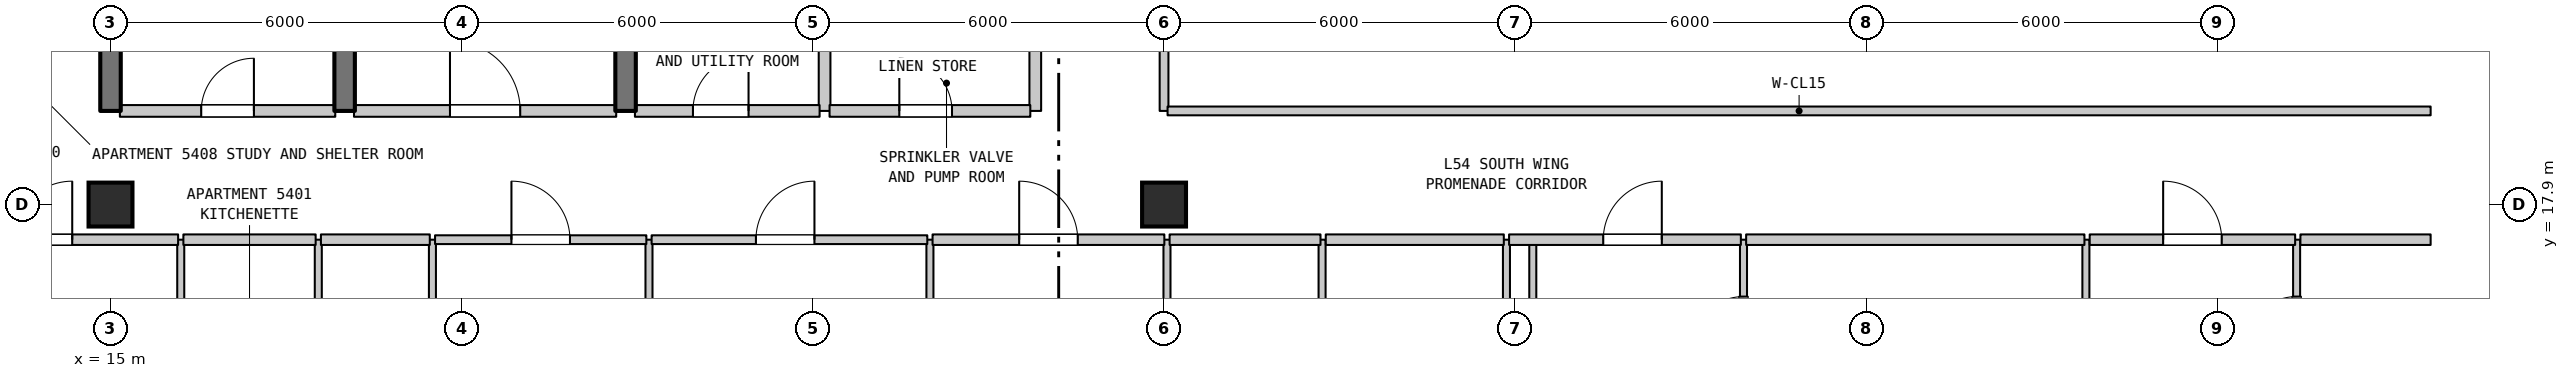
"""IFC4 building model, lengths in metres.
Left out: names, types, materials, properties, quantities, classifications, styles, units other than length and angle.
Written with IfcOpenShell. Run it as: python <this file> out.ifc"""

import sys

from ifc_helpers import new_model, si_unit, direction, frame, frame_2d, origin, origin_2d, place, context, subcontext, project, spatial, rectangle, extrude, element, fill, save


model = new_model("IFC4")
c1 = context("Model", 3, precision=1e-05, world=origin(), true_north=direction((0.0, 1.0)))
c2 = subcontext(c1, "Body", "Model", "MODEL_VIEW")
j1 = project(units=[si_unit("LENGTHUNIT", "METRE"), si_unit("PLANEANGLEUNIT", "RADIAN")], contexts=[c1])
p1 = place(None, origin())
s1 = spatial("IfcSite", under=j1, at=p1, CompositionType="ELEMENT")
p2 = place(p1, origin())
s2 = spatial("IfcBuilding", under=s1, at=p2, CompositionType="ELEMENT")
p3 = place(p2, frame((0.0, 0.0, 218.0)))
s3 = spatial("IfcBuildingStorey", under=s2, at=p3, CompositionType="ELEMENT", Elevation=218.0)
for number, where, z_axis, x_axis in (
    (1, (15.0, 17.9, 0.0), (0.0, 0.0, 1.0), (1.0, 0.0, 0.0)),
    (2, (33.0, 17.9, 0.0), (0.0, 0.0, 1.0), (1.0, 0.0, 0.0)),
):
    element("IfcColumn", number, at=place(p3, frame(where, z_axis=z_axis, x_axis=x_axis)), inside=s3, PredefinedType="COLUMN", context=c2, shape_type="SweptSolid", body=[
        extrude(rectangle(XDim=0.75, YDim=0.75, at=origin_2d()), origin(), (0.0, 0.0, 1.0), 4.8),
    ])
p4 = place(p3, frame((15.0, 19.5, 0.0), z_axis=(0.0, 0.0, 1.0), x_axis=(0.0, 1.0, 0.0)))
e3 = element("IfcWall", 3, at=p4, inside=s3, PredefinedType="SHEAR", context=c2, shape_type="SweptSolid", body=[
    extrude(rectangle(XDim=3.2, YDim=0.35, at=frame_2d((1.6, 0.0))), origin(), (0.0, 0.0, 1.0), 4.49),
])
p5 = place(p3, frame((16.2, 14.1, 0.0), z_axis=(0.0, 0.0, 1.0), x_axis=(0.0, 1.0, 0.0)))
e4 = element("IfcWall", 4, at=p5, inside=s3, PredefinedType="PARTITIONING", context=c2, shape_type="SweptSolid", body=[
    extrude(rectangle(XDim=3.2, YDim=0.12, at=frame_2d((1.6, 0.0))), origin(), (0.0, 0.0, 1.0), 4.49),
])
p6 = place(p5, frame((1.15, 0.0, 0.0)))
e5 = element("IfcOpeningElement", 5, at=p6, cuts=e4, PredefinedType="OPENING", context=c2, shape_type="SweptSolid", body=[
    extrude(rectangle(XDim=0.9, YDim=2.15, at=frame_2d((0.45, 1.075))), frame((0.0, 0.07, 0.0), z_axis=(0.0, -1.0, 0.0), x_axis=(1.0, 0.0, 0.0)), (0.0, 0.0, 1.0), 0.14),
])
p7 = place(p3, frame((18.55, 14.1, 0.0), z_axis=(0.0, 0.0, 1.0), x_axis=(0.0, 1.0, 0.0)))
e6 = element("IfcWall", 6, at=p7, inside=s3, PredefinedType="PARTITIONING", context=c2, shape_type="SweptSolid", body=[
    extrude(rectangle(XDim=3.2, YDim=0.12, at=frame_2d((1.6, 0.0))), origin(), (0.0, 0.0, 1.0), 4.49),
])
p8 = place(p3, frame((19.0, 19.5, 0.0), z_axis=(0.0, 0.0, 1.0), x_axis=(0.0, 1.0, 0.0)))
e7 = element("IfcWall", 7, at=p8, inside=s3, PredefinedType="SHEAR", context=c2, shape_type="SweptSolid", body=[
    extrude(rectangle(XDim=3.2, YDim=0.35, at=frame_2d((1.6, 0.0))), origin(), (0.0, 0.0, 1.0), 4.49),
])
p9 = place(p3, frame((20.5, 7.154, 0.0), z_axis=(0.0, 0.0, 1.0), x_axis=(0.0, 1.0, 0.0)))
e8 = element("IfcWall", 8, at=p9, inside=s3, PredefinedType="PARTITIONING", context=c2, shape_type="SweptSolid", body=[
    extrude(rectangle(XDim=10.146, YDim=0.12, at=frame_2d((5.073, 0.0))), origin(), (0.0, 0.0, 1.0), 4.49),
])
p10 = place(p3, frame((23.8, 19.5, 0.0), z_axis=(0.0, 0.0, 1.0), x_axis=(0.0, 1.0, 0.0)))
e9 = element("IfcWall", 9, at=p10, inside=s3, PredefinedType="SHEAR", context=c2, shape_type="SweptSolid", body=[
    extrude(rectangle(XDim=3.2, YDim=0.35, at=frame_2d((1.6, 0.0))), origin(), (0.0, 0.0, 1.0), 4.49),
])
p11 = place(p3, frame((24.2, 0.71, 0.0), z_axis=(0.0, 0.0, 1.0), x_axis=(0.0, 1.0, 0.0)))
e10 = element("IfcWall", 10, at=p11, inside=s3, PredefinedType="PARTITIONING", context=c2, shape_type="SweptSolid", body=[
    extrude(rectangle(XDim=16.59, YDim=0.12, at=frame_2d((8.295, 0.0))), origin(), (0.0, 0.0, 1.0), 4.49),
])
p12 = place(p3, frame((27.2, 19.5, 0.0), z_axis=(0.0, 0.0, 1.0), x_axis=(0.0, 1.0, 0.0)))
e11 = element("IfcWall", 11, at=p12, inside=s3, PredefinedType="STANDARD", context=c2, shape_type="SweptSolid", body=[
    extrude(rectangle(XDim=1.6, YDim=0.2, at=frame_2d((0.8, 0.0))), origin(), (0.0, 0.0, 1.0), 4.49),
])
p13 = place(p3, frame((29.0, 0.71, 0.0), z_axis=(0.0, 0.0, 1.0), x_axis=(0.0, 1.0, 0.0)))
e12 = element("IfcWall", 12, at=p13, inside=s3, PredefinedType="PARTITIONING", context=c2, shape_type="SweptSolid", body=[
    extrude(rectangle(XDim=16.59, YDim=0.12, at=frame_2d((8.295, 0.0))), origin(), (0.0, 0.0, 1.0), 4.49),
])
p14 = place(p3, frame((30.8, 19.5, 0.0), z_axis=(0.0, 0.0, 1.0), x_axis=(0.0, 1.0, 0.0)))
e13 = element("IfcWall", 13, at=p14, inside=s3, PredefinedType="STANDARD", context=c2, shape_type="SweptSolid", body=[
    extrude(rectangle(XDim=1.6, YDim=0.2, at=frame_2d((0.8, 0.0))), origin(), (0.0, 0.0, 1.0), 4.49),
])
p15 = place(p3, frame((33.0, 19.5, 0.0), z_axis=(0.0, 0.0, 1.0), x_axis=(0.0, 1.0, 0.0)))
e14 = element("IfcWall", 14, at=p15, inside=s3, PredefinedType="STANDARD", context=c2, shape_type="SweptSolid", body=[
    extrude(rectangle(XDim=8.4, YDim=0.15, at=frame_2d((4.2, 0.0))), origin(), (0.0, 0.0, 1.0), 4.09),
])
p16 = place(p15, frame((6.249, 0.0, 0.0)))
e15 = element("IfcOpeningElement", 15, at=p16, cuts=e14, PredefinedType="OPENING", context=c2, shape_type="SweptSolid", body=[
    extrude(rectangle(XDim=1.45, YDim=2.2, at=frame_2d((0.725, 1.1))), frame((0.0, 0.085, 0.0), z_axis=(0.0, -1.0, 0.0), x_axis=(1.0, 0.0, 0.0)), (0.0, 0.0, 1.0), 0.17),
])
p17 = place(p3, frame((33.05, 11.15, 0.0), z_axis=(0.0, 0.0, 1.0), x_axis=(0.0, 1.0, 0.0)))
e16 = element("IfcWall", 16, at=p17, inside=s3, PredefinedType="PARTITIONING", context=c2, shape_type="SweptSolid", body=[
    extrude(rectangle(XDim=6.15, YDim=0.12, at=frame_2d((3.075, 0.0))), origin(), (0.0, 0.0, 1.0), 4.09),
])
for number, where, z_axis, x_axis in (
    (17, (35.7, 11.15, 0.0), (0.0, 0.0, 1.0), (0.0, 1.0, 0.0)),
    (18, (38.85, 11.15, 0.0), (0.0, 0.0, 1.0), (0.0, 1.0, 0.0)),
):
    element("IfcWall", number, at=place(p3, frame(where, z_axis=z_axis, x_axis=x_axis)), inside=s3, PredefinedType="PARTITIONING", context=c2, shape_type="SweptSolid", body=[
        extrude(rectangle(XDim=6.15, YDim=0.12, at=frame_2d((3.075, 0.0))), origin(), (0.0, 0.0, 1.0), 4.49),
    ])
p18 = place(p3, frame((39.3, 0.71, 0.0), z_axis=(0.0, 0.0, 1.0), x_axis=(0.0, 1.0, 0.0)))
e19 = element("IfcWall", 19, at=p18, inside=s3, PredefinedType="PARTITIONING", context=c2, shape_type="SweptSolid", body=[
    extrude(rectangle(XDim=16.59, YDim=0.12, at=frame_2d((8.295, 0.0))), origin(), (0.0, 0.0, 1.0), 4.49),
])
p19 = place(p3, frame((42.9, 14.6, 0.0), z_axis=(0.0, 0.0, 1.0), x_axis=(0.0, 1.0, 0.0)))
e20 = element("IfcWall", 20, at=p19, inside=s3, PredefinedType="PARTITIONING", context=c2, shape_type="SweptSolid", body=[
    extrude(rectangle(XDim=2.7, YDim=0.12, at=frame_2d((1.35, 0.0))), origin(), (0.0, 0.0, 1.0), 4.49),
])
p20 = place(p19, frame((0.828, 0.0, 0.0)))
e21 = element("IfcOpeningElement", 21, at=p20, cuts=e20, PredefinedType="OPENING", context=c2, shape_type="SweptSolid", body=[
    extrude(rectangle(XDim=0.9, YDim=2.1, at=frame_2d((0.45, 1.05))), frame((0.0, 0.07, 0.0), z_axis=(0.0, -1.0, 0.0), x_axis=(1.0, 0.0, 0.0)), (0.0, 0.0, 1.0), 0.14),
])
p21 = place(p3, frame((48.75, 14.6, 0.0), z_axis=(0.0, 0.0, 1.0), x_axis=(0.0, 1.0, 0.0)))
e22 = element("IfcWall", 22, at=p21, inside=s3, PredefinedType="PARTITIONING", context=c2, shape_type="SweptSolid", body=[
    extrude(rectangle(XDim=2.7, YDim=0.12, at=frame_2d((1.35, 0.0))), origin(), (0.0, 0.0, 1.0), 4.49),
])
p22 = place(p3, frame((52.35, 14.6, 0.0), z_axis=(0.0, 0.0, 1.0), x_axis=(0.0, 1.0, 0.0)))
e23 = element("IfcWall", 23, at=p22, inside=s3, PredefinedType="PARTITIONING", context=c2, shape_type="SweptSolid", body=[
    extrude(rectangle(XDim=2.7, YDim=0.12, at=frame_2d((1.35, 0.0))), origin(), (0.0, 0.0, 1.0), 4.49),
])
p23 = place(p22, frame((0.828, 0.0, 0.0)))
e24 = element("IfcOpeningElement", 24, at=p23, cuts=e23, PredefinedType="OPENING", context=c2, shape_type="SweptSolid", body=[
    extrude(rectangle(XDim=0.9, YDim=2.1, at=frame_2d((0.45, 1.05))), frame((0.0, 0.07, 0.0), z_axis=(0.0, -1.0, 0.0), x_axis=(1.0, 0.0, 0.0)), (0.0, 0.0, 1.0), 0.14),
])
p24 = place(p3, frame((12.875, 17.3, 0.0), z_axis=(0.0, 0.0, 1.0), x_axis=(1.0, 0.0, 0.0)))
e25 = element("IfcWall", 25, at=p24, inside=s3, PredefinedType="STANDARD", context=c2, shape_type="SweptSolid", body=[
    extrude(rectangle(XDim=3.28, YDim=0.18, at=frame_2d((1.64, 0.0))), origin(), (0.0, 0.0, 1.0), 4.49),
])
p25 = place(p24, frame((0.471, 0.0, 0.0)))
e26 = element("IfcOpeningElement", 26, at=p25, cuts=e25, PredefinedType="OPENING", context=c2, shape_type="SweptSolid", body=[
    extrude(rectangle(XDim=1.0, YDim=2.15, at=frame_2d((0.5, 1.075))), frame((0.0, 0.1, 0.0), z_axis=(0.0, -1.0, 0.0), x_axis=(1.0, 0.0, 0.0)), (0.0, 0.0, 1.0), 0.2),
])
p26 = place(p3, frame((16.245, 17.3, 0.0), z_axis=(0.0, 0.0, 1.0), x_axis=(1.0, 0.0, 0.0)))
e27 = element("IfcWall", 27, at=p26, inside=s3, PredefinedType="STANDARD", context=c2, shape_type="SweptSolid", body=[
    extrude(rectangle(XDim=2.26, YDim=0.18, at=frame_2d((1.13, 0.0))), origin(), (0.0, 0.0, 1.0), 4.49),
])
p27 = place(p3, frame((18.595, 17.3, 0.0), z_axis=(0.0, 0.0, 1.0), x_axis=(1.0, 0.0, 0.0)))
e28 = element("IfcWall", 28, at=p27, inside=s3, PredefinedType="STANDARD", context=c2, shape_type="SweptSolid", body=[
    extrude(rectangle(XDim=1.86, YDim=0.18, at=frame_2d((0.93, 0.0))), origin(), (0.0, 0.0, 1.0), 4.49),
])
p28 = place(p3, frame((20.545, 17.3, 0.0), z_axis=(0.0, 0.0, 1.0), x_axis=(1.0, 0.0, 0.0)))
e29 = element("IfcWall", 29, at=p28, inside=s3, PredefinedType="STANDARD", context=c2, shape_type="SweptSolid", body=[
    extrude(rectangle(XDim=3.61, YDim=0.15, at=frame_2d((1.805, 0.0))), origin(), (0.0, 0.0, 1.0), 4.49),
])
p29 = place(p28, frame((1.305, 0.0, 0.0)))
e30 = element("IfcOpeningElement", 30, at=p29, cuts=e29, PredefinedType="OPENING", context=c2, shape_type="SweptSolid", body=[
    extrude(rectangle(XDim=1.0, YDim=2.15, at=frame_2d((0.5, 1.075))), frame((0.0, 0.085, 0.0), z_axis=(0.0, -1.0, 0.0), x_axis=(1.0, 0.0, 0.0)), (0.0, 0.0, 1.0), 0.17),
])
p30 = place(p3, frame((24.245, 17.3, 0.0), z_axis=(0.0, 0.0, 1.0), x_axis=(1.0, 0.0, 0.0)))
e31 = element("IfcWall", 31, at=p30, inside=s3, PredefinedType="STANDARD", context=c2, shape_type="SweptSolid", body=[
    extrude(rectangle(XDim=4.71, YDim=0.15, at=frame_2d((2.355, 0.0))), origin(), (0.0, 0.0, 1.0), 4.49),
])
p31 = place(p30, frame((1.782, 0.0, 0.0)))
e32 = element("IfcOpeningElement", 32, at=p31, cuts=e31, PredefinedType="OPENING", context=c2, shape_type="SweptSolid", body=[
    extrude(rectangle(XDim=1.0, YDim=2.15, at=frame_2d((0.5, 1.075))), frame((0.0, 0.085, 0.0), z_axis=(0.0, -1.0, 0.0), x_axis=(1.0, 0.0, 0.0)), (0.0, 0.0, 1.0), 0.17),
])
p32 = place(p3, frame((29.045, 17.3, 0.0), z_axis=(0.0, 0.0, 1.0), x_axis=(1.0, 0.0, 0.0)))
e33 = element("IfcWall", 33, at=p32, inside=s3, PredefinedType="STANDARD", context=c2, shape_type="SweptSolid", body=[
    extrude(rectangle(XDim=3.96, YDim=0.18, at=frame_2d((1.98, 0.0))), origin(), (0.0, 0.0, 1.0), 4.49),
])
p33 = place(p32, frame((1.48, 0.0, 0.0)))
e34 = element("IfcOpeningElement", 34, at=p33, cuts=e33, PredefinedType="OPENING", context=c2, shape_type="SweptSolid", body=[
    extrude(rectangle(XDim=1.0, YDim=2.15, at=frame_2d((0.5, 1.075))), frame((0.0, 0.1, 0.0), z_axis=(0.0, -1.0, 0.0), x_axis=(1.0, 0.0, 0.0)), (0.0, 0.0, 1.0), 0.2),
])
p34 = place(p3, frame((33.095, 17.3, 0.0), z_axis=(0.0, 0.0, 1.0), x_axis=(1.0, 0.0, 0.0)))
e35 = element("IfcWall", 35, at=p34, inside=s3, PredefinedType="STANDARD", context=c2, shape_type="SweptSolid", body=[
    extrude(rectangle(XDim=2.578, YDim=0.18, at=frame_2d((1.289, 0.0))), origin(), (0.0, 0.0, 1.0), 4.49),
])
p35 = place(p3, frame((35.763, 17.3, 0.0), z_axis=(0.0, 0.0, 1.0), x_axis=(1.0, 0.0, 0.0)))
e36 = element("IfcWall", 36, at=p35, inside=s3, PredefinedType="STANDARD", context=c2, shape_type="SweptSolid", body=[
    extrude(rectangle(XDim=3.042, YDim=0.18, at=frame_2d((1.521, 0.0))), origin(), (0.0, 0.0, 1.0), 4.49),
])
p36 = place(p3, frame((38.895, 17.3, 0.0), z_axis=(0.0, 0.0, 1.0), x_axis=(1.0, 0.0, 0.0)))
e37 = element("IfcWall", 37, at=p36, inside=s3, PredefinedType="STANDARD", context=c2, shape_type="SweptSolid", body=[
    extrude(rectangle(XDim=3.96, YDim=0.18, at=frame_2d((1.98, 0.0))), origin(), (0.0, 0.0, 1.0), 4.49),
])
p37 = place(p36, frame((1.609, 0.0, 0.0)))
e38 = element("IfcOpeningElement", 38, at=p37, cuts=e37, PredefinedType="OPENING", context=c2, shape_type="SweptSolid", body=[
    extrude(rectangle(XDim=1.0, YDim=2.15, at=frame_2d((0.5, 1.075))), frame((0.0, 0.1, 0.0), z_axis=(0.0, -1.0, 0.0), x_axis=(1.0, 0.0, 0.0)), (0.0, 0.0, 1.0), 0.2),
])
p38 = place(p3, frame((42.945, 17.3, 0.0), z_axis=(0.0, 0.0, 1.0), x_axis=(1.0, 0.0, 0.0)))
e39 = element("IfcWall", 39, at=p38, inside=s3, PredefinedType="STANDARD", context=c2, shape_type="SweptSolid", body=[
    extrude(rectangle(XDim=5.78, YDim=0.18, at=frame_2d((2.89, 0.0))), origin(), (0.0, 0.0, 1.0), 4.49),
])
p39 = place(p3, frame((48.815, 17.3, 0.0), z_axis=(0.0, 0.0, 1.0), x_axis=(1.0, 0.0, 0.0)))
e40 = element("IfcWall", 40, at=p39, inside=s3, PredefinedType="STANDARD", context=c2, shape_type="SweptSolid", body=[
    extrude(rectangle(XDim=3.51, YDim=0.18, at=frame_2d((1.755, 0.0))), origin(), (0.0, 0.0, 1.0), 4.49),
])
p40 = place(p39, frame((1.255, 0.0, 0.0)))
e41 = element("IfcOpeningElement", 41, at=p40, cuts=e40, PredefinedType="OPENING", context=c2, shape_type="SweptSolid", body=[
    extrude(rectangle(XDim=1.0, YDim=2.15, at=frame_2d((0.5, 1.075))), frame((0.0, 0.1, 0.0), z_axis=(0.0, -1.0, 0.0), x_axis=(1.0, 0.0, 0.0)), (0.0, 0.0, 1.0), 0.2),
])
p41 = place(p3, frame((52.415, 17.3, 0.0), z_axis=(0.0, 0.0, 1.0), x_axis=(1.0, 0.0, 0.0)))
e42 = element("IfcWall", 42, at=p41, inside=s3, PredefinedType="STANDARD", context=c2, shape_type="SweptSolid", body=[
    extrude(rectangle(XDim=2.225, YDim=0.18, at=frame_2d((1.112, 0.0))), origin(), (0.0, 0.0, 1.0), 4.49),
])
p42 = place(p3, frame((15.16, 19.5, 0.0), z_axis=(0.0, 0.0, 1.0), x_axis=(1.0, 0.0, 0.0)))
e43 = element("IfcWall", 43, at=p42, inside=s3, PredefinedType="STANDARD", context=c2, shape_type="SweptSolid", body=[
    extrude(rectangle(XDim=3.68, YDim=0.2, at=frame_2d((1.84, 0.0))), origin(), (0.0, 0.0, 1.0), 4.49),
])
p43 = place(p42, frame((1.39, 0.0, 0.0)))
e44 = element("IfcOpeningElement", 44, at=p43, cuts=e43, PredefinedType="OPENING", context=c2, shape_type="SweptSolid", body=[
    extrude(rectangle(XDim=0.9, YDim=2.15, at=frame_2d((0.45, 1.075))), frame((0.0, 0.11, 0.0), z_axis=(0.0, -1.0, 0.0), x_axis=(1.0, 0.0, 0.0)), (0.0, 0.0, 1.0), 0.22),
])
p44 = place(p3, frame((19.16, 19.5, 0.0), z_axis=(0.0, 0.0, 1.0), x_axis=(1.0, 0.0, 0.0)))
e45 = element("IfcWall", 45, at=p44, inside=s3, PredefinedType="STANDARD", context=c2, shape_type="SweptSolid", body=[
    extrude(rectangle(XDim=4.48, YDim=0.2, at=frame_2d((2.24, 0.0))), origin(), (0.0, 0.0, 1.0), 4.49),
])
p45 = place(p44, frame((1.64, 0.0, 0.0)))
e46 = element("IfcOpeningElement", 46, at=p45, cuts=e45, PredefinedType="OPENING", context=c2, shape_type="SweptSolid", body=[
    extrude(rectangle(XDim=1.2, YDim=2.2, at=frame_2d((0.6, 1.1))), frame((0.0, 0.11, 0.0), z_axis=(0.0, -1.0, 0.0), x_axis=(1.0, 0.0, 0.0)), (0.0, 0.0, 1.0), 0.22),
])
p46 = place(p3, frame((23.96, 19.5, 0.0), z_axis=(0.0, 0.0, 1.0), x_axis=(1.0, 0.0, 0.0)))
e47 = element("IfcWall", 47, at=p46, inside=s3, PredefinedType="STANDARD", context=c2, shape_type="SweptSolid", body=[
    extrude(rectangle(XDim=3.155, YDim=0.2, at=frame_2d((1.578, 0.0))), origin(), (0.0, 0.0, 1.0), 4.49),
])
p47 = place(p46, frame((0.991, 0.0, 0.0)))
e48 = element("IfcOpeningElement", 48, at=p47, cuts=e47, PredefinedType="OPENING", context=c2, shape_type="SweptSolid", body=[
    extrude(rectangle(XDim=0.95, YDim=2.15, at=frame_2d((0.475, 1.075))), frame((0.0, 0.11, 0.0), z_axis=(0.0, -1.0, 0.0), x_axis=(1.0, 0.0, 0.0)), (0.0, 0.0, 1.0), 0.22),
])
p48 = place(p3, frame((27.285, 19.5, 0.0), z_axis=(0.0, 0.0, 1.0), x_axis=(1.0, 0.0, 0.0)))
e49 = element("IfcWall", 49, at=p48, inside=s3, PredefinedType="STANDARD", context=c2, shape_type="SweptSolid", body=[
    extrude(rectangle(XDim=3.43, YDim=0.2, at=frame_2d((1.715, 0.0))), origin(), (0.0, 0.0, 1.0), 4.49),
])
p49 = place(p48, frame((1.192, 0.0, 0.0)))
e50 = element("IfcOpeningElement", 50, at=p49, cuts=e49, PredefinedType="OPENING", context=c2, shape_type="SweptSolid", body=[
    extrude(rectangle(XDim=0.9, YDim=2.15, at=frame_2d((0.45, 1.075))), frame((0.0, 0.11, 0.0), z_axis=(0.0, -1.0, 0.0), x_axis=(1.0, 0.0, 0.0)), (0.0, 0.0, 1.0), 0.22),
])
p50 = place(p3, frame((33.06, 19.5, 0.0), z_axis=(0.0, 0.0, 1.0), x_axis=(1.0, 0.0, 0.0)))
e51 = element("IfcWall", 51, at=p50, inside=s3, PredefinedType="STANDARD", context=c2, shape_type="SweptSolid", body=[
    extrude(rectangle(XDim=21.58, YDim=0.15, at=frame_2d((10.79, 0.0))), origin(), (0.0, 0.0, 1.0), 4.49),
])
p51 = place(p20, origin())
e52 = element("IfcDoor", 52, at=p51, inside=s3, OperationType="SINGLE_SWING_LEFT", PredefinedType="DOOR", context=c2, shape_type="SweptSolid", body=[
    extrude(rectangle(XDim=0.9, YDim=2.1, at=frame_2d((0.45, 1.05))), frame((0.0, 0.025, 0.0), z_axis=(0.0, -1.0, 0.0), x_axis=(1.0, 0.0, 0.0)), (0.0, 0.0, 1.0), 0.05),
])
fill(e21, e52)
p52 = place(p23, origin())
e53 = element("IfcDoor", 53, at=p52, inside=s3, OperationType="SINGLE_SWING_LEFT", PredefinedType="DOOR", context=c2, shape_type="SweptSolid", body=[
    extrude(rectangle(XDim=0.9, YDim=2.1, at=frame_2d((0.45, 1.05))), frame((0.0, 0.025, 0.0), z_axis=(0.0, -1.0, 0.0), x_axis=(1.0, 0.0, 0.0)), (0.0, 0.0, 1.0), 0.05),
])
fill(e24, e53)
p53 = place(p25, origin())
e54 = element("IfcDoor", 54, at=p53, inside=s3, OperationType="SINGLE_SWING_RIGHT", PredefinedType="DOOR", context=c2, shape_type="SweptSolid", body=[
    extrude(rectangle(XDim=1.0, YDim=2.15, at=frame_2d((0.5, 1.075))), frame((0.0, 0.025, 0.0), z_axis=(0.0, -1.0, 0.0), x_axis=(1.0, 0.0, 0.0)), (0.0, 0.0, 1.0), 0.05),
])
fill(e26, e54)
p54 = place(p29, origin())
e55 = element("IfcDoor", 55, at=p54, inside=s3, OperationType="SINGLE_SWING_LEFT", PredefinedType="DOOR", context=c2, shape_type="SweptSolid", body=[
    extrude(rectangle(XDim=1.0, YDim=2.15, at=frame_2d((0.5, 1.075))), frame((0.0, 0.025, 0.0), z_axis=(0.0, -1.0, 0.0), x_axis=(1.0, 0.0, 0.0)), (0.0, 0.0, 1.0), 0.05),
])
fill(e30, e55)
p55 = place(p31, origin())
e56 = element("IfcDoor", 56, at=p55, inside=s3, OperationType="SINGLE_SWING_RIGHT", PredefinedType="DOOR", context=c2, shape_type="SweptSolid", body=[
    extrude(rectangle(XDim=1.0, YDim=2.15, at=frame_2d((0.5, 1.075))), frame((0.0, 0.025, 0.0), z_axis=(0.0, -1.0, 0.0), x_axis=(1.0, 0.0, 0.0)), (0.0, 0.0, 1.0), 0.05),
])
fill(e32, e56)
p56 = place(p33, origin())
e57 = element("IfcDoor", 57, at=p56, inside=s3, OperationType="SINGLE_SWING_LEFT", PredefinedType="DOOR", context=c2, shape_type="SweptSolid", body=[
    extrude(rectangle(XDim=1.0, YDim=2.15, at=frame_2d((0.5, 1.075))), frame((0.0, 0.025, 0.0), z_axis=(0.0, -1.0, 0.0), x_axis=(1.0, 0.0, 0.0)), (0.0, 0.0, 1.0), 0.05),
])
fill(e34, e57)
p57 = place(p37, origin())
e58 = element("IfcDoor", 58, at=p57, inside=s3, OperationType="SINGLE_SWING_RIGHT", PredefinedType="DOOR", context=c2, shape_type="SweptSolid", body=[
    extrude(rectangle(XDim=1.0, YDim=2.15, at=frame_2d((0.5, 1.075))), frame((0.0, 0.025, 0.0), z_axis=(0.0, -1.0, 0.0), x_axis=(1.0, 0.0, 0.0)), (0.0, 0.0, 1.0), 0.05),
])
fill(e38, e58)
p58 = place(p40, origin())
e59 = element("IfcDoor", 59, at=p58, inside=s3, OperationType="SINGLE_SWING_LEFT", PredefinedType="DOOR", context=c2, shape_type="SweptSolid", body=[
    extrude(rectangle(XDim=1.0, YDim=2.15, at=frame_2d((0.5, 1.075))), frame((0.0, 0.025, 0.0), z_axis=(0.0, -1.0, 0.0), x_axis=(1.0, 0.0, 0.0)), (0.0, 0.0, 1.0), 0.05),
])
fill(e41, e59)
p59 = place(p43, origin())
e60 = element("IfcDoor", 60, at=p59, inside=s3, OperationType="SINGLE_SWING_RIGHT", PredefinedType="DOOR", context=c2, shape_type="SweptSolid", body=[
    extrude(rectangle(XDim=0.9, YDim=2.15, at=frame_2d((0.45, 1.075))), frame((0.0, 0.025, 0.0), z_axis=(0.0, -1.0, 0.0), x_axis=(1.0, 0.0, 0.0)), (0.0, 0.0, 1.0), 0.05),
])
fill(e44, e60)
p60 = place(p45, origin())
e61 = element("IfcDoor", 61, at=p60, inside=s3, OperationType="SINGLE_SWING_LEFT", PredefinedType="DOOR", context=c2, shape_type="SweptSolid", body=[
    extrude(rectangle(XDim=1.2, YDim=2.2, at=frame_2d((0.6, 1.1))), frame((0.0, 0.025, 0.0), z_axis=(0.0, -1.0, 0.0), x_axis=(1.0, 0.0, 0.0)), (0.0, 0.0, 1.0), 0.05),
])
fill(e46, e61)
p61 = place(p47, origin())
e62 = element("IfcDoor", 62, at=p61, inside=s3, OperationType="SINGLE_SWING_RIGHT", PredefinedType="DOOR", context=c2, shape_type="SweptSolid", body=[
    extrude(rectangle(XDim=0.95, YDim=2.15, at=frame_2d((0.475, 1.075))), frame((0.0, 0.025, 0.0), z_axis=(0.0, -1.0, 0.0), x_axis=(1.0, 0.0, 0.0)), (0.0, 0.0, 1.0), 0.05),
])
fill(e48, e62)
p62 = place(p49, origin())
e63 = element("IfcDoor", 63, at=p62, inside=s3, OperationType="SINGLE_SWING_LEFT", PredefinedType="DOOR", context=c2, shape_type="SweptSolid", body=[
    extrude(rectangle(XDim=0.9, YDim=2.15, at=frame_2d((0.45, 1.075))), frame((0.0, 0.025, 0.0), z_axis=(0.0, -1.0, 0.0), x_axis=(1.0, 0.0, 0.0)), (0.0, 0.0, 1.0), 0.05),
])
fill(e50, e63)
save(model, sys.argv[1])
